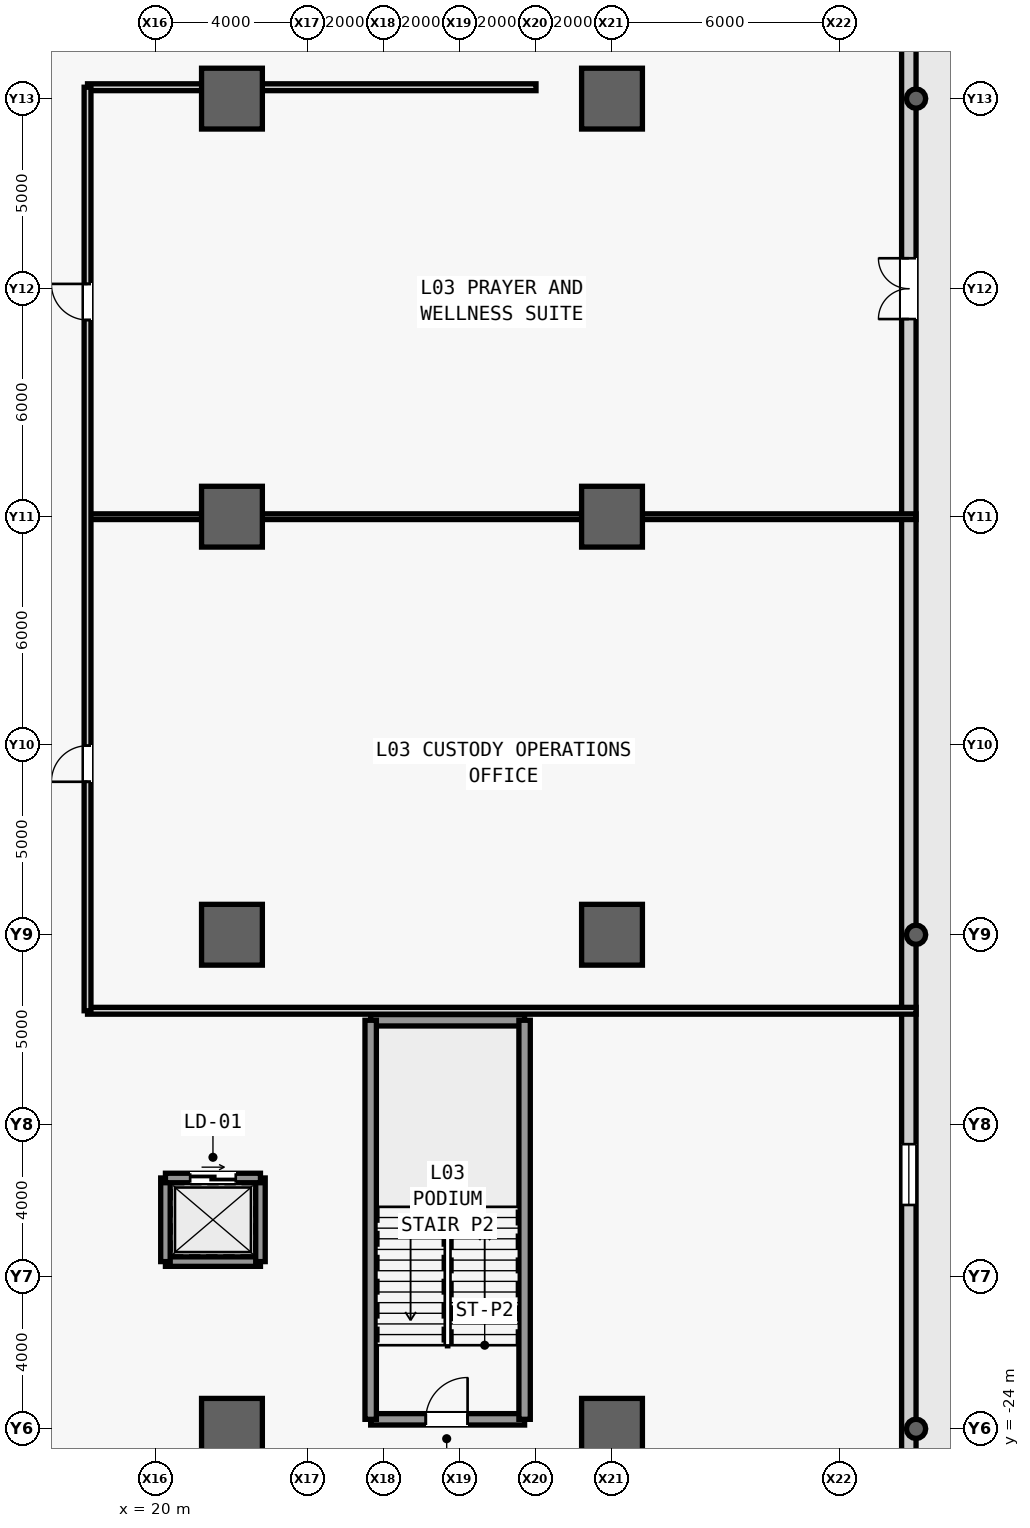
"""IFC4 building model, lengths in metres.
Left out: names, types, materials, properties, quantities, classifications, styles, units other than length and angle.
Written with IfcOpenShell. Run it as: python <this file> out.ifc"""

import sys

from ifc_helpers import new_model, si_unit, direction, frame, frame_2d, origin, origin_2d, place, context, subcontext, project, spatial, rectangle, hollow_circle, extrude, source, transform, mapped, element, fill, save


model = new_model("IFC4")
c1 = context("Model", 3, precision=1e-05, world=origin(), true_north=direction((0.0, 1.0)))
c2 = subcontext(c1, "Body", "Model", "MODEL_VIEW")
j1 = project(units=[si_unit("LENGTHUNIT", "METRE"), si_unit("PLANEANGLEUNIT", "RADIAN")], contexts=[c1])
p1 = place(None, origin())
s1 = spatial("IfcSite", under=j1, at=p1, CompositionType="ELEMENT")
p2 = place(p1, origin())
s2 = spatial("IfcBuilding", under=s1, at=p2, CompositionType="ELEMENT")
p3 = place(p2, frame((0.0, 0.0, 17.4)))
s3 = spatial("IfcBuildingStorey", under=s2, at=p3, CompositionType="ELEMENT", Elevation=17.4)
m1 = source(origin(), c2, "Body", "SweptSolid", [
    extrude(rectangle(XDim=1.6, YDim=1.6, at=origin_2d()), origin(), (0.0, 0.0, 1.0), 4.8),
])
for number, where, z_axis, x_axis in (
    (1, (22.0, -24.0, 0.0), (0.0, 0.0, 1.0), (1.0, 0.0, 0.0)),
    (2, (22.0, -11.0, 0.0), (0.0, 0.0, 1.0), (1.0, 0.0, 0.0)),
    (3, (22.0, 0.0, 0.0), (0.0, 0.0, 1.0), (1.0, 0.0, 0.0)),
    (4, (22.0, 11.0, 0.0), (0.0, 0.0, 1.0), (1.0, 0.0, 0.0)),
    (5, (32.0, -24.0, 0.0), (0.0, 0.0, 1.0), (1.0, 0.0, 0.0)),
    (6, (32.0, -11.0, 0.0), (0.0, 0.0, 1.0), (1.0, 0.0, 0.0)),
    (7, (32.0, 0.0, 0.0), (0.0, 0.0, 1.0), (1.0, 0.0, 0.0)),
    (8, (32.0, 11.0, 0.0), (0.0, 0.0, 1.0), (1.0, 0.0, 0.0)),
):
    element("IfcColumn", number, at=place(p3, frame(where, z_axis=z_axis, x_axis=x_axis)), inside=s3, PredefinedType="COLUMN", context=c2, shape_type="MappedRepresentation", body=[
        mapped(m1, transform((0.0, 0.0, 0.0), scale=1.0)),
    ])
m2 = source(origin(), c2, "Body", "SweptSolid", [
    extrude(hollow_circle(Radius=0.254, WallThickness=0.025, at=origin_2d()), origin(), (0.0, 0.0, 1.0), 4.8),
])
for number, where, z_axis, x_axis in (
    (9, (40.0, -24.0, 0.0), (0.0, 0.0, 1.0), (1.0, 0.0, 0.0)),
    (10, (40.0, -11.0, 0.0), (0.0, 0.0, 1.0), (1.0, 0.0, 0.0)),
    (11, (40.0, 11.0, 0.0), (0.0, 0.0, 1.0), (1.0, 0.0, 0.0)),
):
    element("IfcColumn", number, at=place(p3, frame(where, z_axis=z_axis, x_axis=x_axis)), inside=s3, PredefinedType="COLUMN", context=c2, shape_type="MappedRepresentation", body=[
        mapped(m2, transform((0.0, 0.0, 0.0), scale=1.0)),
    ])
m3 = source(origin(), c2, "Body", "SweptSolid", [
    extrude(rectangle(XDim=69.24, YDim=0.38, at=frame_2d((34.62, 0.0))), origin(), (0.0, 0.0, 1.0), 2.68),
])
p4 = place(p3, frame((39.81, -34.62, 0.0), z_axis=(0.0, 0.0, 1.0), x_axis=(0.0, 1.0, 0.0)))
e12 = element("IfcWall", 12, at=p4, inside=s3, PredefinedType="STANDARD", context=c2, shape_type="MappedRepresentation", body=[
    mapped(m3, transform((0.0, 0.0, 0.0), scale=1.0)),
])
m4 = source(origin(), c2, "Body", "SweptSolid", [
    extrude(rectangle(XDim=1.6, YDim=2.25, at=frame_2d((0.8, 1.125))), frame((0.0, 0.2, 0.0), z_axis=(0.0, -1.0, 0.0), x_axis=(1.0, 0.0, 0.0)), (0.0, 0.0, 1.0), 0.4),
])
p5 = place(p4, frame((39.82, 0.0, 0.0)))
e13 = element("IfcOpeningElement", 13, at=p5, cuts=e12, PredefinedType="OPENING", context=c2, shape_type="MappedRepresentation", body=[
    mapped(m4, transform((0.0, 0.0, 0.0), scale=1.0)),
])
m5 = source(origin(), c2, "Body", "SweptSolid", [
    extrude(rectangle(XDim=1.6, YDim=1.96, at=frame_2d((0.8, 0.98))), frame((0.0, 0.2, 0.0), z_axis=(0.0, -1.0, 0.0), x_axis=(1.0, 0.0, 0.0)), (0.0, 0.0, 1.0), 0.4),
])
p6 = place(p4, frame((16.51, 0.0, 0.5)))
e14 = element("IfcOpeningElement", 14, at=p6, cuts=e12, PredefinedType="OPENING", context=c2, shape_type="MappedRepresentation", body=[
    mapped(m5, transform((0.0, 0.0, 0.0), scale=1.0)),
])
p7 = place(p4, frame((51.13, 0.0, 0.5)))
e15 = element("IfcOpeningElement", 15, at=p7, cuts=e12, PredefinedType="OPENING", context=c2, shape_type="MappedRepresentation", body=[
    mapped(m5, transform((0.0, 0.0, 0.0), scale=1.0)),
])
m6 = source(origin(), c2, "Body", "SweptSolid", [
    extrude(rectangle(XDim=4.05, YDim=0.3, at=frame_2d((2.025, 0.0))), origin(), (0.0, 0.0, 1.0), 4.48),
])
p8 = place(p3, frame((25.65, -23.75, 0.0), z_axis=(0.0, 0.0, 1.0), x_axis=(1.0, 0.0, 0.0)))
e16 = element("IfcWall", 16, at=p8, inside=s3, PredefinedType="SHEAR", context=c2, shape_type="MappedRepresentation", body=[
    mapped(m6, transform((0.0, 0.0, 0.0), scale=1.0)),
])
m7 = source(origin(), c2, "Body", "SweptSolid", [
    extrude(rectangle(XDim=1.1, YDim=2.2, at=frame_2d((0.55, 1.1))), frame((0.0, 0.16, 0.0), z_axis=(0.0, -1.0, 0.0), x_axis=(1.0, 0.0, 0.0)), (0.0, 0.0, 1.0), 0.32),
])
p9 = place(p8, frame((1.45, 0.0, 0.0)))
e17 = element("IfcOpeningElement", 17, at=p9, cuts=e16, PredefinedType="OPENING", context=c2, shape_type="MappedRepresentation", body=[
    mapped(m7, transform((0.0, 0.0, 0.0), scale=1.0)),
])
p10 = place(p3, frame((25.65, -13.25, 0.0), z_axis=(0.0, 0.0, 1.0), x_axis=(1.0, 0.0, 0.0)))
e18 = element("IfcWall", 18, at=p10, inside=s3, PredefinedType="SHEAR", context=c2, shape_type="MappedRepresentation", body=[
    mapped(m6, transform((0.0, 0.0, 0.0), scale=1.0)),
])
m8 = source(origin(), c2, "Body", "SweptSolid", [
    extrude(rectangle(XDim=10.5, YDim=0.3, at=frame_2d((5.25, 0.0))), origin(), (0.0, 0.0, 1.0), 4.48),
])
for number, where, z_axis, x_axis in (
    (19, (25.65, -23.75, 0.0), (0.0, 0.0, 1.0), (0.0, 1.0, 0.0)),
    (20, (29.7, -23.75, 0.0), (0.0, 0.0, 1.0), (0.0, 1.0, 0.0)),
):
    element("IfcWall", number, at=place(p3, frame(where, z_axis=z_axis, x_axis=x_axis)), inside=s3, PredefinedType="SHEAR", context=c2, shape_type="MappedRepresentation", body=[
        mapped(m8, transform((0.0, 0.0, 0.0), scale=1.0)),
    ])
m9 = source(origin(), c2, "Body", "SweptSolid", [
    extrude(rectangle(XDim=2.5, YDim=0.25, at=frame_2d((1.25, 0.0))), origin(), (0.0, 0.0, 1.0), 4.48),
])
p11 = place(p3, frame((20.25, -19.6, 0.0), z_axis=(0.0, 0.0, 1.0), x_axis=(1.0, 0.0, 0.0)))
e21 = element("IfcWall", 21, at=p11, inside=s3, PredefinedType="SHEAR", context=c2, shape_type="MappedRepresentation", body=[
    mapped(m9, transform((0.0, 0.0, 0.0), scale=1.0)),
])
m10 = source(origin(), c2, "Body", "SweptSolid", [
    extrude(rectangle(XDim=2.2, YDim=0.25, at=frame_2d((1.1, 0.0))), origin(), (0.0, 0.0, 1.0), 4.48),
])
for number, where, z_axis, x_axis in (
    (22, (20.25, -19.6, 0.0), (0.0, 0.0, 1.0), (0.0, 1.0, 0.0)),
    (23, (22.75, -19.6, 0.0), (0.0, 0.0, 1.0), (0.0, 1.0, 0.0)),
):
    element("IfcWall", number, at=place(p3, frame(where, z_axis=z_axis, x_axis=x_axis)), inside=s3, PredefinedType="SHEAR", context=c2, shape_type="MappedRepresentation", body=[
        mapped(m10, transform((0.0, 0.0, 0.0), scale=1.0)),
    ])
p12 = place(p3, frame((20.25, -17.4, 0.0), z_axis=(0.0, 0.0, 1.0), x_axis=(1.0, 0.0, 0.0)))
e24 = element("IfcWall", 24, at=p12, inside=s3, PredefinedType="SHEAR", context=c2, shape_type="MappedRepresentation", body=[
    mapped(m9, transform((0.0, 0.0, 0.0), scale=1.0)),
])
m11 = source(origin(), c2, "Body", "SweptSolid", [
    extrude(rectangle(XDim=1.2, YDim=2.3, at=frame_2d((0.6, 1.15))), frame((0.0, 0.135, 0.0), z_axis=(0.0, -1.0, 0.0), x_axis=(1.0, 0.0, 0.0)), (0.0, 0.0, 1.0), 0.27),
])
p13 = place(p12, frame((0.65, 0.0, 0.0)))
e25 = element("IfcOpeningElement", 25, at=p13, cuts=e24, PredefinedType="OPENING", context=c2, shape_type="MappedRepresentation", body=[
    mapped(m11, transform((0.0, 0.0, 0.0), scale=1.0)),
])
m12 = source(origin(), c2, "Body", "SweptSolid", [
    extrude(rectangle(XDim=11.8, YDim=0.18, at=frame_2d((5.9, 0.0))), origin(), (0.0, 0.0, 1.0), 2.68),
])
p14 = place(p3, frame((18.2, 11.3, 0.0), z_axis=(0.0, 0.0, 1.0), x_axis=(1.0, 0.0, 0.0)))
e26 = element("IfcWall", 26, at=p14, inside=s3, PredefinedType="PARTITIONING", context=c2, shape_type="MappedRepresentation", body=[
    mapped(m12, transform((0.0, 0.0, 0.0), scale=1.0)),
])
m13 = source(origin(), c2, "Body", "SweptSolid", [
    extrude(rectangle(XDim=21.8, YDim=0.18, at=frame_2d((10.9, 0.0))), origin(), (0.0, 0.0, 1.0), 4.48),
])
p15 = place(p3, frame((18.2, -13.0, 0.0), z_axis=(0.0, 0.0, 1.0), x_axis=(1.0, 0.0, 0.0)))
e27 = element("IfcWall", 27, at=p15, inside=s3, PredefinedType="PARTITIONING", context=c2, shape_type="MappedRepresentation", body=[
    mapped(m13, transform((0.0, 0.0, 0.0), scale=1.0)),
])
m14 = source(origin(), c2, "Body", "SweptSolid", [
    extrude(rectangle(XDim=21.8, YDim=0.15, at=frame_2d((10.9, 0.0))), origin(), (0.0, 0.0, 1.0), 2.68),
])
p16 = place(p3, frame((18.2, 0.0, 0.0), z_axis=(0.0, 0.0, 1.0), x_axis=(1.0, 0.0, 0.0)))
e28 = element("IfcWall", 28, at=p16, inside=s3, PredefinedType="PARTITIONING", context=c2, shape_type="MappedRepresentation", body=[
    mapped(m14, transform((0.0, 0.0, 0.0), scale=1.0)),
])
m15 = source(origin(), c2, "Body", "SweptSolid", [
    extrude(rectangle(XDim=24.3, YDim=0.18, at=frame_2d((12.15, 0.0))), origin(), (0.0, 0.0, 1.0), 4.48),
])
p17 = place(p3, frame((18.2, -13.0, 0.0), z_axis=(0.0, 0.0, 1.0), x_axis=(0.0, 1.0, 0.0)))
e29 = element("IfcWall", 29, at=p17, inside=s3, PredefinedType="PARTITIONING", context=c2, shape_type="MappedRepresentation", body=[
    mapped(m15, transform((0.0, 0.0, 0.0), scale=1.0)),
])
m16 = source(origin(), c2, "Body", "SweptSolid", [
    extrude(rectangle(XDim=0.95, YDim=2.15, at=frame_2d((0.475, 1.075))), frame((0.0, 0.1, 0.0), z_axis=(0.0, -1.0, 0.0), x_axis=(1.0, 0.0, 0.0)), (0.0, 0.0, 1.0), 0.2),
])
p18 = place(p17, frame((6.025, 0.0, 0.0)))
e30 = element("IfcOpeningElement", 30, at=p18, cuts=e29, PredefinedType="OPENING", context=c2, shape_type="MappedRepresentation", body=[
    mapped(m16, transform((0.0, 0.0, 0.0), scale=1.0)),
])
p19 = place(p17, frame((18.175, 0.0, 0.0)))
e31 = element("IfcOpeningElement", 31, at=p19, cuts=e29, PredefinedType="OPENING", context=c2, shape_type="MappedRepresentation", body=[
    mapped(m16, transform((0.0, 0.0, 0.0), scale=1.0)),
])
m17 = source(origin(), c2, "Body", "SweptSolid", [
    extrude(rectangle(XDim=1.6, YDim=2.25, at=frame_2d((0.8, 1.125))), frame((0.0, 0.025, 0.0), z_axis=(0.0, -1.0, 0.0), x_axis=(1.0, 0.0, 0.0)), (0.0, 0.0, 1.0), 0.05),
])
p20 = place(p5, origin())
e32 = element("IfcDoor", 32, at=p20, inside=s3, OperationType="DOUBLE_DOOR_SINGLE_SWING", PredefinedType="DOOR", context=c2, shape_type="MappedRepresentation", body=[
    mapped(m17, transform((0.0, 0.0, 0.0), scale=1.0)),
])
fill(e13, e32)
m18 = source(origin(), c2, "Body", "SweptSolid", [
    extrude(rectangle(XDim=1.6, YDim=1.96, at=frame_2d((0.8, 0.98))), frame((0.0, 0.03, 0.0), z_axis=(0.0, -1.0, 0.0), x_axis=(1.0, 0.0, 0.0)), (0.0, 0.0, 1.0), 0.06),
])
p21 = place(p6, origin())
e33 = element("IfcWindow", 33, at=p21, inside=s3, PartitioningType="SINGLE_PANEL", PredefinedType="WINDOW", context=c2, shape_type="MappedRepresentation", body=[
    mapped(m18, transform((0.0, 0.0, 0.0), scale=1.0)),
])
fill(e14, e33)
m19 = source(origin(), c2, "Body", "SweptSolid", [
    extrude(rectangle(XDim=1.1, YDim=2.2, at=frame_2d((0.55, 1.1))), frame((0.0, 0.025, 0.0), z_axis=(0.0, -1.0, 0.0), x_axis=(1.0, 0.0, 0.0)), (0.0, 0.0, 1.0), 0.05),
])
p22 = place(p9, origin())
e34 = element("IfcDoor", 34, at=p22, inside=s3, OperationType="SINGLE_SWING_RIGHT", PredefinedType="DOOR", context=c2, shape_type="MappedRepresentation", body=[
    mapped(m19, transform((0.0, 0.0, 0.0), scale=1.0)),
])
fill(e17, e34)
m20 = source(origin(), c2, "Body", "SweptSolid", [
    extrude(rectangle(XDim=0.95, YDim=2.15, at=frame_2d((0.475, 1.075))), frame((0.0, 0.025, 0.0), z_axis=(0.0, -1.0, 0.0), x_axis=(1.0, 0.0, 0.0)), (0.0, 0.0, 1.0), 0.05),
])
p23 = place(p18, origin())
e35 = element("IfcDoor", 35, at=p23, inside=s3, OperationType="SINGLE_SWING_LEFT", PredefinedType="DOOR", context=c2, shape_type="MappedRepresentation", body=[
    mapped(m20, transform((0.0, 0.0, 0.0), scale=1.0)),
])
fill(e30, e35)
p24 = place(p19, origin())
e36 = element("IfcDoor", 36, at=p24, inside=s3, OperationType="SINGLE_SWING_RIGHT", PredefinedType="DOOR", context=c2, shape_type="MappedRepresentation", body=[
    mapped(m20, transform((0.0, 0.0, 0.0), scale=1.0)),
])
fill(e31, e36)
m21 = source(origin(), c2, "Body", "SweptSolid", [
    extrude(rectangle(XDim=1.2, YDim=2.3, at=frame_2d((0.6, 1.15))), frame((0.0, 0.025, 0.0), z_axis=(0.0, -1.0, 0.0), x_axis=(1.0, 0.0, 0.0)), (0.0, 0.0, 1.0), 0.05),
])
p25 = place(p13, origin())
e37 = element("IfcDoor", 37, at=p25, inside=s3, OperationType="SLIDING_TO_LEFT", PredefinedType="DOOR", context=c2, shape_type="MappedRepresentation", body=[
    mapped(m21, transform((0.0, 0.0, 0.0), scale=1.0)),
])
fill(e25, e37)
save(model, sys.argv[1])
